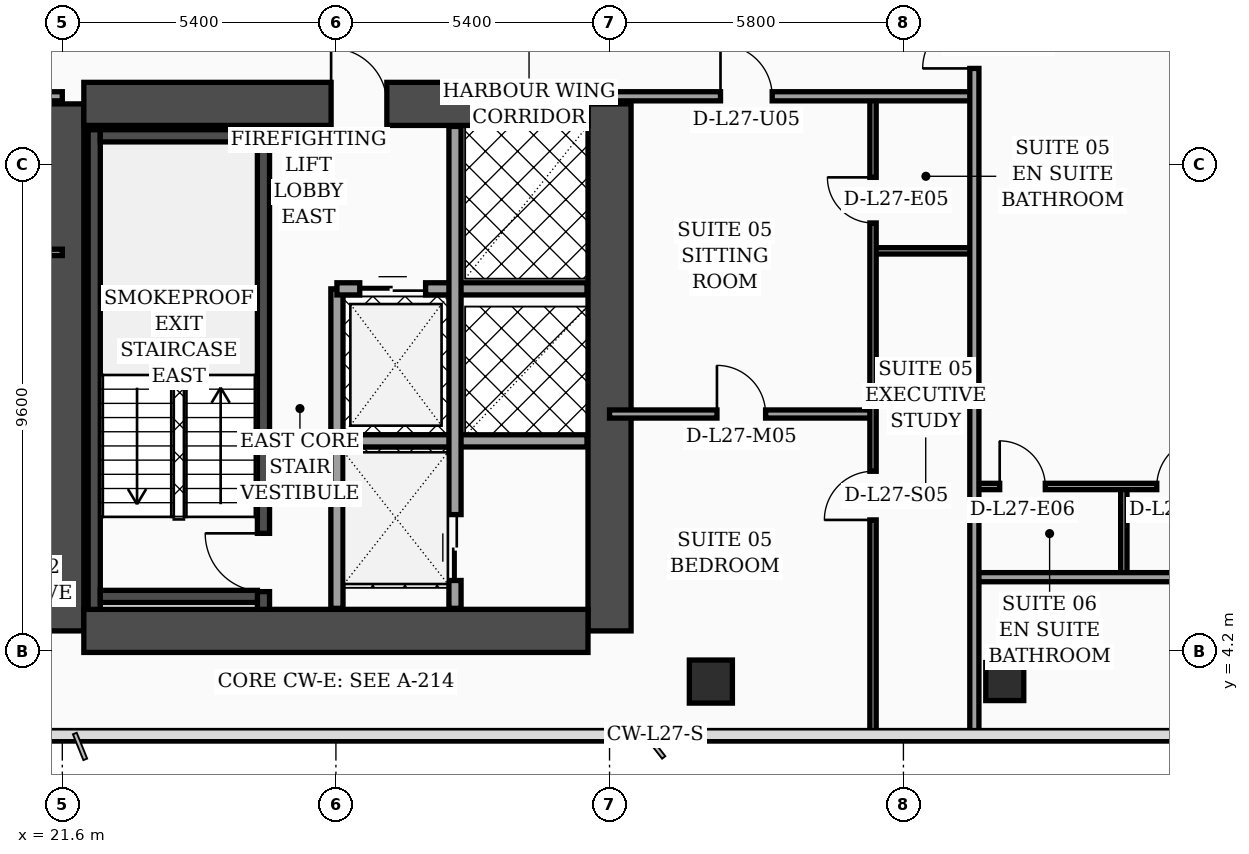
"""IFC4 building model, lengths in metres.
Left out: names, types, materials, properties, quantities, classifications, styles, units other than length and angle.
Written with IfcOpenShell. Run it as: python <this file> out.ifc"""

import sys

from ifc_helpers import new_model, si_unit, direction, frame, frame_2d, origin, origin_2d, place, context, subcontext, project, spatial, rectangle, hollow_rectangle, extrude, element, fill, save


model = new_model("IFC4")
c1 = context("Model", 3, precision=1e-05, world=origin(), true_north=direction((0.0, 1.0)))
c2 = subcontext(c1, "Body", "Model", "MODEL_VIEW")
j1 = project(units=[si_unit("LENGTHUNIT", "METRE"), si_unit("PLANEANGLEUNIT", "RADIAN")], contexts=[c1])
p1 = place(None, origin())
s1 = spatial("IfcSite", under=j1, at=p1, CompositionType="ELEMENT")
p2 = place(p1, origin())
s2 = spatial("IfcBuilding", under=s1, at=p2, CompositionType="ELEMENT")
p3 = place(p2, frame((0.0, 0.0, 112.6)))
s3 = spatial("IfcBuildingStorey", under=s2, at=p3, CompositionType="ELEMENT", Elevation=112.6)
for number, where, z_axis, x_axis in (
    (1, (21.6, 4.6, 0.0), (0.0, 0.0, 1.0), (0.0, 1.0, 0.0)),
    (2, (32.4, 4.6, 0.0), (0.0, 0.0, 1.0), (0.0, 1.0, 0.0)),
):
    element("IfcWall", number, at=place(p3, frame(where, z_axis=z_axis, x_axis=x_axis)), inside=s3, PredefinedType="SHEAR", context=c2, shape_type="SweptSolid", body=[
        extrude(rectangle(XDim=10.4, YDim=0.85, at=frame_2d((5.2, 0.0))), origin(), (0.0, 0.0, 1.0), 3.56),
    ])
p4 = place(p3, frame((22.025, 15.0, 0.0), z_axis=(0.0, 0.0, 1.0), x_axis=(1.0, 0.0, 0.0)))
e3 = element("IfcWall", 3, at=p4, inside=s3, PredefinedType="SHEAR", context=c2, shape_type="SweptSolid", body=[
    extrude(rectangle(XDim=9.95, YDim=0.85, at=frame_2d((4.975, 0.0))), origin(), (0.0, 0.0, 1.0), 3.56),
])
p5 = place(p4, frame((4.88, 0.0, 0.0)))
e4 = element("IfcOpeningElement", 4, at=p5, cuts=e3, PredefinedType="OPENING", context=c2, shape_type="SweptSolid", body=[
    extrude(rectangle(XDim=1.1, YDim=2.2, at=frame_2d((0.55, 1.1))), frame((0.0, 0.435, 0.0), z_axis=(0.0, -1.0, 0.0), x_axis=(1.0, 0.0, 0.0)), (0.0, 0.0, 1.0), 0.87),
])
p6 = place(p3, frame((22.025, 4.6, 0.0), z_axis=(0.0, 0.0, 1.0), x_axis=(1.0, 0.0, 0.0)))
e5 = element("IfcWall", 5, at=p6, inside=s3, PredefinedType="SHEAR", context=c2, shape_type="SweptSolid", body=[
    extrude(rectangle(XDim=9.95, YDim=0.85, at=frame_2d((4.975, 0.0))), origin(), (0.0, 0.0, 1.0), 3.56),
])
p7 = place(p3, frame((22.23, 5.025, 0.0), z_axis=(0.0, 0.0, 1.0), x_axis=(0.0, 1.0, 0.0)))
e6 = element("IfcWall", 6, at=p7, inside=s3, PredefinedType="SOLIDWALL", context=c2, shape_type="SweptSolid", body=[
    extrude(rectangle(XDim=9.465, YDim=0.24, at=frame_2d((4.732, 0.0))), origin(), (0.0, 0.0, 1.0), 3.56),
])
p8 = place(p3, frame((25.57, 5.025, 0.0), z_axis=(0.0, 0.0, 1.0), x_axis=(0.0, 1.0, 0.0)))
e7 = element("IfcWall", 7, at=p8, inside=s3, PredefinedType="SOLIDWALL", context=c2, shape_type="SweptSolid", body=[
    extrude(rectangle(XDim=9.465, YDim=0.24, at=frame_2d((4.732, 0.0))), origin(), (0.0, 0.0, 1.0), 3.56),
])
p9 = place(p8, frame((0.35, 0.0, 0.0)))
e8 = element("IfcOpeningElement", 8, at=p9, cuts=e7, PredefinedType="OPENING", context=c2, shape_type="SweptSolid", body=[
    extrude(rectangle(XDim=1.15, YDim=2.2, at=frame_2d((0.575, 1.1))), frame((0.0, 0.13, 0.0), z_axis=(0.0, -1.0, 0.0), x_axis=(1.0, 0.0, 0.0)), (0.0, 0.0, 1.0), 0.26),
])
for number, where, z_axis, x_axis in (
    (9, (22.35, 5.28, 0.0), (0.0, 0.0, 1.0), (1.0, 0.0, 0.0)),
    (10, (22.35, 14.37, 0.0), (0.0, 0.0, 1.0), (1.0, 0.0, 0.0)),
):
    element("IfcWall", number, at=place(p3, frame(where, z_axis=z_axis, x_axis=x_axis)), inside=s3, PredefinedType="SOLIDWALL", context=c2, shape_type="SweptSolid", body=[
        extrude(rectangle(XDim=3.1, YDim=0.24, at=frame_2d((1.55, 0.0))), origin(), (0.0, 0.0, 1.0), 3.56),
    ])
p10 = place(p3, frame((34.4, 3.6, 0.0), z_axis=(0.0, 0.0, 1.0), x_axis=(1.0, 0.0, 0.0)))
e11 = element("IfcColumn", 11, at=p10, inside=s3, PredefinedType="COLUMN", context=c2, shape_type="SweptSolid", body=[
    extrude(hollow_rectangle(XDim=0.85, YDim=0.85, WallThickness=0.036, at=origin_2d()), origin(), (0.0, 0.0, 1.0), 3.56),
])
p11 = place(p3, frame((40.2, 3.6, 0.0), z_axis=(0.0, 0.0, 1.0), x_axis=(1.0, 0.0, 0.0)))
e12 = element("IfcColumn", 12, at=p11, inside=s3, PredefinedType="COLUMN", context=c2, shape_type="SweptSolid", body=[
    extrude(hollow_rectangle(XDim=0.75, YDim=0.75, WallThickness=0.032, at=origin_2d()), origin(), (0.0, 0.0, 1.0), 3.56),
])
p12 = place(p3, frame((27.02, 5.045, 0.0), z_axis=(0.0, 0.0, 1.0), x_axis=(0.0, 1.0, 0.0)))
e13 = element("IfcWall", 13, at=p12, inside=s3, PredefinedType="SOLIDWALL", context=c2, shape_type="SweptSolid", body=[
    extrude(rectangle(XDim=6.305, YDim=0.24, at=frame_2d((3.153, 0.0))), origin(), (0.0, 0.0, 1.0), 3.56),
])
p13 = place(p3, frame((27.02, 11.35, 0.0), z_axis=(0.0, 0.0, 1.0), x_axis=(1.0, 0.0, 0.0)))
e14 = element("IfcWall", 14, at=p13, inside=s3, PredefinedType="SOLIDWALL", context=c2, shape_type="SweptSolid", body=[
    extrude(rectangle(XDim=4.935, YDim=0.24, at=frame_2d((2.468, 0.0))), origin(), (0.0, 0.0, 1.0), 3.56),
])
p14 = place(p13, frame((0.45, 0.0, 0.0)))
e15 = element("IfcOpeningElement", 15, at=p14, cuts=e14, PredefinedType="OPENING", context=c2, shape_type="SweptSolid", body=[
    extrude(rectangle(XDim=1.3, YDim=2.35, at=frame_2d((0.65, 1.175))), frame((0.0, 0.13, 0.0), z_axis=(0.0, -1.0, 0.0), x_axis=(1.0, 0.0, 0.0)), (0.0, 0.0, 1.0), 0.26),
])
p15 = place(p3, frame((27.02, 8.35, 0.0), z_axis=(0.0, 0.0, 1.0), x_axis=(1.0, 0.0, 0.0)))
e16 = element("IfcWall", 16, at=p15, inside=s3, PredefinedType="SOLIDWALL", context=c2, shape_type="SweptSolid", body=[
    extrude(rectangle(XDim=4.935, YDim=0.24, at=frame_2d((2.468, 0.0))), origin(), (0.0, 0.0, 1.0), 3.56),
])
p16 = place(p3, frame((29.35, 5.045, 0.0), z_axis=(0.0, 0.0, 1.0), x_axis=(0.0, 1.0, 0.0)))
e17 = element("IfcWall", 17, at=p16, inside=s3, PredefinedType="SOLIDWALL", context=c2, shape_type="SweptSolid", body=[
    extrude(rectangle(XDim=9.51, YDim=0.24, at=frame_2d((4.755, 0.0))), origin(), (0.0, 0.0, 1.0), 3.56),
])
p17 = place(p16, frame((0.55, 0.0, 0.0)))
e18 = element("IfcOpeningElement", 18, at=p17, cuts=e17, PredefinedType="OPENING", context=c2, shape_type="SweptSolid", body=[
    extrude(rectangle(XDim=1.3, YDim=2.35, at=frame_2d((0.65, 1.175))), frame((0.0, 0.13, 0.0), z_axis=(0.0, -1.0, 0.0), x_axis=(1.0, 0.0, 0.0)), (0.0, 0.0, 1.0), 0.26),
])
p18 = place(p3, frame((19.6, 12.07, 0.0), z_axis=(0.0, 0.0, 1.0), x_axis=(1.0, 0.0, 0.0)))
e19 = element("IfcWall", 19, at=p18, inside=s3, PredefinedType="PARTITIONING", context=c2, shape_type="SweptSolid", body=[
    extrude(rectangle(XDim=2.0, YDim=0.125, at=frame_2d((1.0, 0.0))), origin(), (0.0, 0.0, 1.0), 3.56),
])
p19 = place(p3, frame((15.15, 15.15, 0.0), z_axis=(0.0, 0.0, 1.0), x_axis=(1.0, 0.0, 0.0)))
e20 = element("IfcWall", 20, at=p19, inside=s3, PredefinedType="PARTITIONING", context=c2, shape_type="SweptSolid", body=[
    extrude(rectangle(XDim=6.45, YDim=0.18, at=frame_2d((3.225, 0.0))), origin(), (0.0, 0.0, 1.0), 2.49),
])
p20 = place(p19, frame((1.74, 0.0, 0.0)))
e21 = element("IfcOpeningElement", 21, at=p20, cuts=e20, PredefinedType="OPENING", context=c2, shape_type="SweptSolid", body=[
    extrude(rectangle(XDim=1.02, YDim=2.2, at=frame_2d((0.51, 1.1))), frame((0.0, 0.1, 0.0), z_axis=(0.0, -1.0, 0.0), x_axis=(1.0, 0.0, 0.0)), (0.0, 0.0, 1.0), 0.2),
])
p21 = place(p3, frame((37.6, 12.1, 0.0), z_axis=(0.0, 0.0, 1.0), x_axis=(1.0, 0.0, 0.0)))
e22 = element("IfcWall", 22, at=p21, inside=s3, PredefinedType="PARTITIONING", context=c2, shape_type="SweptSolid", body=[
    extrude(rectangle(XDim=2.0, YDim=0.125, at=frame_2d((1.0, 0.0))), origin(), (0.0, 0.0, 1.0), 3.56),
])
p22 = place(p3, frame((32.4, 8.88, 0.0), z_axis=(0.0, 0.0, 1.0), x_axis=(1.0, 0.0, 0.0)))
e23 = element("IfcWall", 23, at=p22, inside=s3, PredefinedType="PARTITIONING", context=c2, shape_type="SweptSolid", body=[
    extrude(rectangle(XDim=5.2, YDim=0.16, at=frame_2d((2.6, 0.0))), origin(), (0.0, 0.0, 1.0), 2.84),
])
p23 = place(p22, frame((2.12, 0.0, 0.0)))
e24 = element("IfcOpeningElement", 24, at=p23, cuts=e23, PredefinedType="OPENING", context=c2, shape_type="SweptSolid", body=[
    extrude(rectangle(XDim=0.96, YDim=2.2, at=frame_2d((0.48, 1.1))), frame((0.0, 0.09, 0.0), z_axis=(0.0, -1.0, 0.0), x_axis=(1.0, 0.0, 0.0)), (0.0, 0.0, 1.0), 0.18),
])
p24 = place(p3, frame((37.6, 2.44, 0.0), z_axis=(0.0, 0.0, 1.0), x_axis=(0.0, 1.0, 0.0)))
e25 = element("IfcWall", 25, at=p24, inside=s3, PredefinedType="PARTITIONING", context=c2, shape_type="SweptSolid", body=[
    extrude(rectangle(XDim=12.71, YDim=0.125, at=frame_2d((6.355, 0.0))), origin(), (0.0, 0.0, 1.0), 2.84),
])
p25 = place(p24, frame((4.35, 0.0, 0.0)))
e26 = element("IfcOpeningElement", 26, at=p25, cuts=e25, PredefinedType="OPENING", context=c2, shape_type="SweptSolid", body=[
    extrude(rectangle(XDim=0.96, YDim=2.2, at=frame_2d((0.48, 1.1))), frame((0.0, 0.073, 0.0), z_axis=(0.0, -1.0, 0.0), x_axis=(1.0, 0.0, 0.0)), (0.0, 0.0, 1.0), 0.145),
])
p26 = place(p24, frame((10.21, 0.0, 0.0)))
e27 = element("IfcOpeningElement", 27, at=p26, cuts=e25, PredefinedType="OPENING", context=c2, shape_type="SweptSolid", body=[
    extrude(rectangle(XDim=0.9, YDim=2.15, at=frame_2d((0.45, 1.075))), frame((0.0, 0.073, 0.0), z_axis=(0.0, -1.0, 0.0), x_axis=(1.0, 0.0, 0.0)), (0.0, 0.0, 1.0), 0.145),
])
p27 = place(p3, frame((32.4, 15.15, 0.0), z_axis=(0.0, 0.0, 1.0), x_axis=(1.0, 0.0, 0.0)))
e28 = element("IfcWall", 28, at=p27, inside=s3, PredefinedType="PARTITIONING", context=c2, shape_type="SweptSolid", body=[
    extrude(rectangle(XDim=7.2, YDim=0.18, at=frame_2d((3.6, 0.0))), origin(), (0.0, 0.0, 1.0), 2.84),
])
p28 = place(p27, frame((2.19, 0.0, 0.0)))
e29 = element("IfcOpeningElement", 29, at=p28, cuts=e28, PredefinedType="OPENING", context=c2, shape_type="SweptSolid", body=[
    extrude(rectangle(XDim=1.02, YDim=2.2, at=frame_2d((0.51, 1.1))), frame((0.0, 0.1, 0.0), z_axis=(0.0, -1.0, 0.0), x_axis=(1.0, 0.0, 0.0)), (0.0, 0.0, 1.0), 0.2),
])
p29 = place(p3, frame((42.55, 5.66, 0.0), z_axis=(0.0, 0.0, 1.0), x_axis=(0.0, 1.0, 0.0)))
e30 = element("IfcWall", 30, at=p29, inside=s3, PredefinedType="PARTITIONING", context=c2, shape_type="SweptSolid", body=[
    extrude(rectangle(XDim=1.79, YDim=0.125, at=frame_2d((0.895, 0.0))), origin(), (0.0, 0.0, 1.0), 3.56),
])
p30 = place(p3, frame((39.6, 7.45, 0.0), z_axis=(0.0, 0.0, 1.0), x_axis=(1.0, 0.0, 0.0)))
e31 = element("IfcWall", 31, at=p30, inside=s3, PredefinedType="PARTITIONING", context=c2, shape_type="SweptSolid", body=[
    extrude(rectangle(XDim=18.96, YDim=0.125, at=frame_2d((9.48, 0.0))), origin(), (0.0, 0.0, 1.0), 2.84),
])
p31 = place(p30, frame((0.5, 0.0, 0.0)))
e32 = element("IfcOpeningElement", 32, at=p31, cuts=e31, PredefinedType="OPENING", context=c2, shape_type="SweptSolid", body=[
    extrude(rectangle(XDim=0.9, YDim=2.15, at=frame_2d((0.45, 1.075))), frame((0.0, 0.073, 0.0), z_axis=(0.0, -1.0, 0.0), x_axis=(1.0, 0.0, 0.0)), (0.0, 0.0, 1.0), 0.145),
])
p32 = place(p30, frame((3.6, 0.0, 0.0)))
e33 = element("IfcOpeningElement", 33, at=p32, cuts=e31, PredefinedType="OPENING", context=c2, shape_type="SweptSolid", body=[
    extrude(rectangle(XDim=0.96, YDim=2.2, at=frame_2d((0.48, 1.1))), frame((0.0, 0.073, 0.0), z_axis=(0.0, -1.0, 0.0), x_axis=(1.0, 0.0, 0.0)), (0.0, 0.0, 1.0), 0.145),
])
p33 = place(p3, frame((39.6, 5.66, 0.0), z_axis=(0.0, 0.0, 1.0), x_axis=(1.0, 0.0, 0.0)))
e34 = element("IfcWall", 34, at=p33, inside=s3, PredefinedType="PARTITIONING", context=c2, shape_type="SweptSolid", body=[
    extrude(rectangle(XDim=16.4, YDim=0.18, at=frame_2d((8.2, 0.0))), origin(), (0.0, 0.0, 1.0), 2.84),
])
p34 = place(p3, frame((39.6, 2.44, 0.0), z_axis=(0.0, 0.0, 1.0), x_axis=(0.0, 1.0, 0.0)))
e35 = element("IfcWall", 35, at=p34, inside=s3, PredefinedType="PARTITIONING", context=c2, shape_type="SweptSolid", body=[
    extrude(rectangle(XDim=31.04, YDim=0.18, at=frame_2d((15.52, 0.0))), origin(), (0.0, 0.0, 1.0), 2.84),
])
p35 = place(p34, frame((13.26, 0.0, 0.0)))
e36 = element("IfcOpeningElement", 36, at=p35, cuts=e35, PredefinedType="OPENING", context=c2, shape_type="SweptSolid", body=[
    extrude(rectangle(XDim=1.02, YDim=2.2, at=frame_2d((0.51, 1.1))), frame((0.0, 0.1, 0.0), z_axis=(0.0, -1.0, 0.0), x_axis=(1.0, 0.0, 0.0)), (0.0, 0.0, 1.0), 0.2),
])
p36 = place(p34, frame((17.77, 0.0, 0.0)))
e37 = element("IfcOpeningElement", 37, at=p36, cuts=e35, PredefinedType="OPENING", context=c2, shape_type="SweptSolid", body=[
    extrude(rectangle(XDim=1.02, YDim=2.2, at=frame_2d((0.51, 1.1))), frame((0.0, 0.1, 0.0), z_axis=(0.0, -1.0, 0.0), x_axis=(1.0, 0.0, 0.0)), (0.0, 0.0, 1.0), 0.2),
])
p37 = place(p34, frame((25.58, 0.0, 0.0)))
e38 = element("IfcOpeningElement", 38, at=p37, cuts=e35, PredefinedType="OPENING", context=c2, shape_type="SweptSolid", body=[
    extrude(rectangle(XDim=1.02, YDim=2.2, at=frame_2d((0.51, 1.1))), frame((0.0, 0.1, 0.0), z_axis=(0.0, -1.0, 0.0), x_axis=(1.0, 0.0, 0.0)), (0.0, 0.0, 1.0), 0.2),
])
p38 = place(p14, origin())
e39 = element("IfcDoor", 39, at=p38, inside=s3, OperationType="DOUBLE_DOOR_SLIDING", PredefinedType="DOOR", context=c2, shape_type="SweptSolid", body=[
    extrude(rectangle(XDim=1.3, YDim=2.35, at=frame_2d((0.65, 1.175))), frame((0.0, 0.025, 0.0), z_axis=(0.0, -1.0, 0.0), x_axis=(1.0, 0.0, 0.0)), (0.0, 0.0, 1.0), 0.05),
])
fill(e15, e39)
p39 = place(p17, origin())
e40 = element("IfcDoor", 40, at=p39, inside=s3, OperationType="DOUBLE_DOOR_SLIDING", PredefinedType="DOOR", context=c2, shape_type="SweptSolid", body=[
    extrude(rectangle(XDim=1.3, YDim=2.35, at=frame_2d((0.65, 1.175))), frame((0.0, 0.025, 0.0), z_axis=(0.0, -1.0, 0.0), x_axis=(1.0, 0.0, 0.0)), (0.0, 0.0, 1.0), 0.05),
])
fill(e18, e40)
p40 = place(p23, origin())
e41 = element("IfcDoor", 41, at=p40, inside=s3, OperationType="SINGLE_SWING_LEFT", PredefinedType="DOOR", context=c2, shape_type="SweptSolid", body=[
    extrude(rectangle(XDim=0.96, YDim=2.2, at=frame_2d((0.48, 1.1))), frame((0.0, 0.025, 0.0), z_axis=(0.0, -1.0, 0.0), x_axis=(1.0, 0.0, 0.0)), (0.0, 0.0, 1.0), 0.05),
])
fill(e24, e41)
p41 = place(p25, origin())
e42 = element("IfcDoor", 42, at=p41, inside=s3, OperationType="SINGLE_SWING_LEFT", PredefinedType="DOOR", context=c2, shape_type="SweptSolid", body=[
    extrude(rectangle(XDim=0.96, YDim=2.2, at=frame_2d((0.48, 1.1))), frame((0.0, 0.025, 0.0), z_axis=(0.0, -1.0, 0.0), x_axis=(1.0, 0.0, 0.0)), (0.0, 0.0, 1.0), 0.05),
])
fill(e26, e42)
p42 = place(p26, origin())
e43 = element("IfcDoor", 43, at=p42, inside=s3, OperationType="SINGLE_SWING_RIGHT", PredefinedType="DOOR", context=c2, shape_type="SweptSolid", body=[
    extrude(rectangle(XDim=0.9, YDim=2.15, at=frame_2d((0.45, 1.075))), frame((0.0, 0.025, 0.0), z_axis=(0.0, -1.0, 0.0), x_axis=(1.0, 0.0, 0.0)), (0.0, 0.0, 1.0), 0.05),
])
fill(e27, e43)
p43 = place(p28, origin())
e44 = element("IfcDoor", 44, at=p43, inside=s3, OperationType="SINGLE_SWING_LEFT", PredefinedType="DOOR", context=c2, shape_type="SweptSolid", body=[
    extrude(rectangle(XDim=1.02, YDim=2.2, at=frame_2d((0.51, 1.1))), frame((0.0, 0.025, 0.0), z_axis=(0.0, -1.0, 0.0), x_axis=(1.0, 0.0, 0.0)), (0.0, 0.0, 1.0), 0.05),
])
fill(e29, e44)
p44 = place(p31, origin())
e45 = element("IfcDoor", 45, at=p44, inside=s3, OperationType="SINGLE_SWING_LEFT", PredefinedType="DOOR", context=c2, shape_type="SweptSolid", body=[
    extrude(rectangle(XDim=0.9, YDim=2.15, at=frame_2d((0.45, 1.075))), frame((0.0, 0.025, 0.0), z_axis=(0.0, -1.0, 0.0), x_axis=(1.0, 0.0, 0.0)), (0.0, 0.0, 1.0), 0.05),
])
fill(e32, e45)
p45 = place(p32, origin())
e46 = element("IfcDoor", 46, at=p45, inside=s3, OperationType="SINGLE_SWING_RIGHT", PredefinedType="DOOR", context=c2, shape_type="SweptSolid", body=[
    extrude(rectangle(XDim=0.96, YDim=2.2, at=frame_2d((0.48, 1.1))), frame((0.0, 0.025, 0.0), z_axis=(0.0, -1.0, 0.0), x_axis=(1.0, 0.0, 0.0)), (0.0, 0.0, 1.0), 0.05),
])
fill(e33, e46)
p46 = place(p35, origin())
e47 = element("IfcDoor", 47, at=p46, inside=s3, OperationType="SINGLE_SWING_LEFT", PredefinedType="DOOR", context=c2, shape_type="SweptSolid", body=[
    extrude(rectangle(XDim=1.02, YDim=2.2, at=frame_2d((0.51, 1.1))), frame((0.0, 0.025, 0.0), z_axis=(0.0, -1.0, 0.0), x_axis=(1.0, 0.0, 0.0)), (0.0, 0.0, 1.0), 0.05),
])
fill(e36, e47)
p47 = place(p9, origin())
e48 = element("IfcDoor", 48, at=p47, inside=s3, OperationType="SINGLE_SWING_RIGHT", PredefinedType="DOOR", context=c2, shape_type="SweptSolid", body=[
    extrude(rectangle(XDim=1.15, YDim=2.2, at=frame_2d((0.575, 1.1))), frame((0.0, 0.025, 0.0), z_axis=(0.0, -1.0, 0.0), x_axis=(1.0, 0.0, 0.0)), (0.0, 0.0, 1.0), 0.05),
])
fill(e8, e48)
p48 = place(p5, origin())
e49 = element("IfcDoor", 49, at=p48, inside=s3, OperationType="SINGLE_SWING_LEFT", PredefinedType="DOOR", context=c2, shape_type="SweptSolid", body=[
    extrude(rectangle(XDim=1.1, YDim=2.2, at=frame_2d((0.55, 1.1))), frame((0.0, 0.025, 0.0), z_axis=(0.0, -1.0, 0.0), x_axis=(1.0, 0.0, 0.0)), (0.0, 0.0, 1.0), 0.05),
])
fill(e4, e49)
save(model, sys.argv[1])
